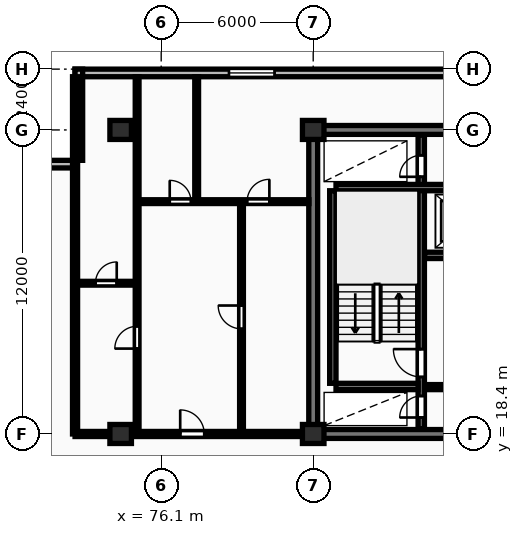
"""IFC4 building model, lengths in metres.
Left out: names, types, materials, properties, quantities, classifications, styles, units other than length and angle.
Written with IfcOpenShell. Run it as: python <this file> out.ifc"""

import sys

from ifc_helpers import new_model, si_unit, direction, frame, frame_2d, origin, origin_2d, place, context, subcontext, project, spatial, rectangle, extrude, element, fill, save


model = new_model("IFC4")
c1 = context("Model", 3, precision=1e-05, world=origin(), true_north=direction((0.0, 1.0)))
c2 = subcontext(c1, "Body", "Model", "MODEL_VIEW")
j1 = project(units=[si_unit("LENGTHUNIT", "METRE"), si_unit("PLANEANGLEUNIT", "RADIAN")], contexts=[c1])
p1 = place(None, origin())
s1 = spatial("IfcSite", under=j1, at=p1, CompositionType="ELEMENT")
p2 = place(p1, origin())
s2 = spatial("IfcBuilding", under=s1, at=p2, CompositionType="ELEMENT")
p3 = place(p2, frame((0.0, 0.0, 119.8)))
s3 = spatial("IfcBuildingStorey", under=s2, at=p3, CompositionType="ELEMENT", Elevation=119.8)
for number, where, z_axis, x_axis in (
    (1, (74.5, 18.4, 0.0), (0.0, 0.0, 1.0), (1.0, 0.0, 0.0)),
    (2, (74.5, 30.4, 0.0), (0.0, 0.0, 1.0), (1.0, 0.0, 0.0)),
    (3, (82.1, 18.4, 0.0), (0.0, 0.0, 1.0), (1.0, 0.0, 0.0)),
    (4, (82.1, 30.4, 0.0), (0.0, 0.0, 1.0), (1.0, 0.0, 0.0)),
):
    element("IfcColumn", number, at=place(p3, frame(where, z_axis=z_axis, x_axis=x_axis)), inside=s3, PredefinedType="COLUMN", context=c2, shape_type="SweptSolid", body=[
        extrude(rectangle(XDim=0.85, YDim=0.75, at=origin_2d()), origin(), (0.0, 0.0, 1.0), 3.25),
    ])
p4 = place(p3, frame((130.7, 32.65, 0.0), z_axis=(0.0, 0.0, 1.0), x_axis=(-1.0, 0.0, 0.0)))
e5 = element("IfcWall", 5, at=p4, inside=s3, PredefinedType="STANDARD", context=c2, shape_type="SweptSolid", body=[
    extrude(rectangle(XDim=58.0, YDim=0.3, at=frame_2d((29.0, 0.0))), origin(), (0.0, 0.0, 1.0), 2.97),
])
p5 = place(p4, frame((50.125, 0.0, 0.85)))
e6 = element("IfcOpeningElement", 6, at=p5, cuts=e5, PredefinedType="OPENING", context=c2, shape_type="SweptSolid", body=[
    extrude(rectangle(XDim=1.8, YDim=1.8, at=frame_2d((0.9, 0.9))), frame((0.0, 0.16, 0.0), z_axis=(0.0, -1.0, 0.0), x_axis=(1.0, 0.0, 0.0)), (0.0, 0.0, 1.0), 0.32),
])
p6 = place(p4, frame((6.775, 0.0, 0.85)))
e7 = element("IfcOpeningElement", 7, at=p6, cuts=e5, PredefinedType="OPENING", context=c2, shape_type="SweptSolid", body=[
    extrude(rectangle(XDim=1.8, YDim=1.8, at=frame_2d((0.9, 0.9))), frame((0.0, 0.16, 0.0), z_axis=(0.0, -1.0, 0.0), x_axis=(1.0, 0.0, 0.0)), (0.0, 0.0, 1.0), 0.32),
])
p7 = place(p3, frame((72.85, 32.8, 0.0), z_axis=(0.0, 0.0, 1.0), x_axis=(0.0, -1.0, 0.0)))
e8 = element("IfcWall", 8, at=p7, inside=s3, PredefinedType="STANDARD", context=c2, shape_type="SweptSolid", body=[
    extrude(rectangle(XDim=3.6, YDim=0.3, at=frame_2d((1.8, 0.0))), origin(), (0.0, 0.0, 1.0), 2.97),
])
p8 = place(p3, frame((72.7, 29.05, 0.0), z_axis=(0.0, 0.0, 1.0), x_axis=(-1.0, 0.0, 0.0)))
e9 = element("IfcWall", 9, at=p8, inside=s3, PredefinedType="STANDARD", context=c2, shape_type="SweptSolid", body=[
    extrude(rectangle(XDim=3.6, YDim=0.3, at=frame_2d((1.8, 0.0))), origin(), (0.0, 0.0, 1.0), 2.97),
])
p9 = place(p3, frame((81.925, 30.4, 0.0), z_axis=(0.0, 0.0, 1.0), x_axis=(1.0, 0.0, 0.0)))
e10 = element("IfcWall", 10, at=p9, inside=s3, PredefinedType="SHEAR", context=c2, shape_type="SweptSolid", body=[
    extrude(rectangle(XDim=36.265, YDim=0.35, at=frame_2d((18.132, 0.0))), origin(), (0.0, 0.0, 1.0), 3.25),
])
p10 = place(p3, frame((82.1, 18.575, 0.0), z_axis=(0.0, 0.0, 1.0), x_axis=(0.0, 1.0, 0.0)))
e11 = element("IfcWall", 11, at=p10, inside=s3, PredefinedType="SHEAR", context=c2, shape_type="SweptSolid", body=[
    extrude(rectangle(XDim=11.65, YDim=0.35, at=frame_2d((5.825, 0.0))), origin(), (0.0, 0.0, 1.0), 3.25),
])
p11 = place(p3, frame((81.925, 18.4, 0.0), z_axis=(0.0, 0.0, 1.0), x_axis=(1.0, 0.0, 0.0)))
e12 = element("IfcWall", 12, at=p11, inside=s3, PredefinedType="SHEAR", context=c2, shape_type="SweptSolid", body=[
    extrude(rectangle(XDim=36.265, YDim=0.35, at=frame_2d((18.132, 0.0))), origin(), (0.0, 0.0, 1.0), 3.25),
])
p12 = place(p11, frame((5.675, 0.0, 0.0)))
e13 = element("IfcOpeningElement", 13, at=p12, cuts=e12, PredefinedType="OPENING", context=c2, shape_type="SweptSolid", body=[
    extrude(rectangle(XDim=1.0, YDim=2.15, at=frame_2d((0.5, 1.075))), frame((0.0, 0.185, 0.0), z_axis=(0.0, -1.0, 0.0), x_axis=(1.0, 0.0, 0.0)), (0.0, 0.0, 1.0), 0.37),
])
p13 = place(p11, frame((21.925, 0.0, 0.0)))
e14 = element("IfcOpeningElement", 14, at=p13, cuts=e12, PredefinedType="OPENING", context=c2, shape_type="SweptSolid", body=[
    extrude(rectangle(XDim=1.5, YDim=2.2, at=frame_2d((0.75, 1.1))), frame((0.0, 0.185, 0.0), z_axis=(0.0, -1.0, 0.0), x_axis=(1.0, 0.0, 0.0)), (0.0, 0.0, 1.0), 0.37),
])
p14 = place(p11, frame((29.875, 0.0, 0.0)))
e15 = element("IfcOpeningElement", 15, at=p14, cuts=e12, PredefinedType="OPENING", context=c2, shape_type="SweptSolid", body=[
    extrude(rectangle(XDim=1.0, YDim=2.15, at=frame_2d((0.5, 1.075))), frame((0.0, 0.185, 0.0), z_axis=(0.0, -1.0, 0.0), x_axis=(1.0, 0.0, 0.0)), (0.0, 0.0, 1.0), 0.37),
])
p15 = place(p3, frame((82.875, 20.4, 0.0), z_axis=(0.0, 0.0, 1.0), x_axis=(0.0, 1.0, 0.0)))
e16 = element("IfcWall", 16, at=p15, inside=s3, PredefinedType="SHEAR", context=c2, shape_type="SweptSolid", body=[
    extrude(rectangle(XDim=7.6, YDim=0.25, at=frame_2d((3.8, 0.0))), origin(), (0.0, 0.0, 1.0), 3.25),
])
p16 = place(p3, frame((86.365, 18.6, 0.0), z_axis=(0.0, 0.0, 1.0), x_axis=(0.0, 1.0, 0.0)))
e17 = element("IfcWall", 17, at=p16, inside=s3, PredefinedType="SHEAR", context=c2, shape_type="SweptSolid", body=[
    extrude(rectangle(XDim=11.6, YDim=0.25, at=frame_2d((5.8, 0.0))), origin(), (0.0, 0.0, 1.0), 3.25),
])
p17 = place(p16, frame((0.45, 0.0, 0.0)))
e18 = element("IfcOpeningElement", 18, at=p17, cuts=e17, PredefinedType="OPENING", context=c2, shape_type="SweptSolid", body=[
    extrude(rectangle(XDim=0.85, YDim=2.05, at=frame_2d((0.425, 1.025))), frame((0.0, 0.135, 0.0), z_axis=(0.0, -1.0, 0.0), x_axis=(1.0, 0.0, 0.0)), (0.0, 0.0, 1.0), 0.27),
])
p18 = place(p16, frame((2.05, 0.0, 0.0)))
e19 = element("IfcOpeningElement", 19, at=p18, cuts=e17, PredefinedType="OPENING", context=c2, shape_type="SweptSolid", body=[
    extrude(rectangle(XDim=1.1, YDim=2.1, at=frame_2d((0.55, 1.05))), frame((0.0, 0.135, 0.0), z_axis=(0.0, -1.0, 0.0), x_axis=(1.0, 0.0, 0.0)), (0.0, 0.0, 1.0), 0.27),
])
p19 = place(p16, frame((9.95, 0.0, 0.0)))
e20 = element("IfcOpeningElement", 20, at=p19, cuts=e17, PredefinedType="OPENING", context=c2, shape_type="SweptSolid", body=[
    extrude(rectangle(XDim=0.85, YDim=2.05, at=frame_2d((0.425, 1.025))), frame((0.0, 0.135, 0.0), z_axis=(0.0, -1.0, 0.0), x_axis=(1.0, 0.0, 0.0)), (0.0, 0.0, 1.0), 0.27),
])
p20 = place(p3, frame((83.0, 20.275, 0.0), z_axis=(0.0, 0.0, 1.0), x_axis=(1.0, 0.0, 0.0)))
e21 = element("IfcWall", 21, at=p20, inside=s3, PredefinedType="SHEAR", context=c2, shape_type="SweptSolid", body=[
    extrude(rectangle(XDim=3.24, YDim=0.25, at=frame_2d((1.62, 0.0))), origin(), (0.0, 0.0, 1.0), 3.25),
])
p21 = place(p3, frame((83.0, 28.125, 0.0), z_axis=(0.0, 0.0, 1.0), x_axis=(1.0, 0.0, 0.0)))
e22 = element("IfcWall", 22, at=p21, inside=s3, PredefinedType="SHEAR", context=c2, shape_type="SweptSolid", body=[
    extrude(rectangle(XDim=7.82, YDim=0.25, at=frame_2d((3.91, 0.0))), origin(), (0.0, 0.0, 1.0), 3.25),
])
p22 = place(p3, frame((86.5, 25.45, 0.0), z_axis=(0.0, 0.0, 1.0), x_axis=(1.0, 0.0, 0.0)))
e23 = element("IfcWall", 23, at=p22, inside=s3, PredefinedType="SHEAR", context=c2, shape_type="SweptSolid", body=[
    extrude(rectangle(XDim=4.32, YDim=0.25, at=frame_2d((2.16, 0.0))), origin(), (0.0, 0.0, 1.0), 3.25),
])
p23 = place(p22, frame((1.14, 0.0, 0.0)))
e24 = element("IfcOpeningElement", 24, at=p23, cuts=e23, PredefinedType="OPENING", context=c2, shape_type="SweptSolid", body=[
    extrude(rectangle(XDim=1.12, YDim=2.12, at=frame_2d((0.56, 1.06))), frame((0.0, 0.135, 0.0), z_axis=(0.0, -1.0, 0.0), x_axis=(1.0, 0.0, 0.0)), (0.0, 0.0, 1.0), 0.27),
])
p24 = place(p22, frame((3.25, 0.0, 0.0)))
e25 = element("IfcOpeningElement", 25, at=p24, cuts=e23, PredefinedType="OPENING", context=c2, shape_type="SweptSolid", body=[
    extrude(rectangle(XDim=0.85, YDim=2.05, at=frame_2d((0.425, 1.025))), frame((0.0, 0.135, 0.0), z_axis=(0.0, -1.0, 0.0), x_axis=(1.0, 0.0, 0.0)), (0.0, 0.0, 1.0), 0.27),
])
p25 = place(p3, frame((86.5, 20.25, 0.0), z_axis=(0.0, 0.0, 1.0), x_axis=(1.0, 0.0, 0.0)))
e26 = element("IfcWall", 26, at=p25, inside=s3, PredefinedType="PARTITIONING", context=c2, shape_type="SweptSolid", body=[
    extrude(rectangle(XDim=4.32, YDim=0.2, at=frame_2d((2.16, 0.0))), origin(), (0.0, 0.0, 1.0), 2.97),
])
p26 = place(p25, frame((1.4, 0.0, 0.0)))
e27 = element("IfcOpeningElement", 27, at=p26, cuts=e26, PredefinedType="OPENING", context=c2, shape_type="SweptSolid", body=[
    extrude(rectangle(XDim=1.1, YDim=2.1, at=frame_2d((0.55, 1.05))), frame((0.0, 0.11, 0.0), z_axis=(0.0, -1.0, 0.0), x_axis=(1.0, 0.0, 0.0)), (0.0, 0.0, 1.0), 0.22),
])
p27 = place(p3, frame((72.7, 18.4, 0.0), z_axis=(0.0, 0.0, 1.0), x_axis=(0.0, 1.0, 0.0)))
e28 = element("IfcWall", 28, at=p27, inside=s3, PredefinedType="PARTITIONING", context=c2, shape_type="SweptSolid", body=[
    extrude(rectangle(XDim=14.1, YDim=0.2, at=frame_2d((7.05, 0.0))), origin(), (0.0, 0.0, 1.0), 2.97),
])
p28 = place(p3, frame((72.7, 24.35, 0.0), z_axis=(0.0, 0.0, 1.0), x_axis=(1.0, 0.0, 0.0)))
e29 = element("IfcWall", 29, at=p28, inside=s3, PredefinedType="PARTITIONING", context=c2, shape_type="SweptSolid", body=[
    extrude(rectangle(XDim=2.45, YDim=0.15, at=frame_2d((1.225, 0.0))), origin(), (0.0, 0.0, 1.0), 2.97),
])
p29 = place(p28, frame((0.805, 0.0, 0.0)))
e30 = element("IfcOpeningElement", 30, at=p29, cuts=e29, PredefinedType="OPENING", context=c2, shape_type="SweptSolid", body=[
    extrude(rectangle(XDim=0.84, YDim=2.04, at=frame_2d((0.42, 1.02))), frame((0.0, 0.085, 0.0), z_axis=(0.0, -1.0, 0.0), x_axis=(1.0, 0.0, 0.0)), (0.0, 0.0, 1.0), 0.17),
])
p30 = place(p3, frame((75.15, 18.45, 0.0), z_axis=(0.0, 0.0, 1.0), x_axis=(0.0, 1.0, 0.0)))
e31 = element("IfcWall", 31, at=p30, inside=s3, PredefinedType="PARTITIONING", context=c2, shape_type="SweptSolid", body=[
    extrude(rectangle(XDim=14.05, YDim=0.15, at=frame_2d((7.025, 0.0))), origin(), (0.0, 0.0, 1.0), 2.97),
])
p31 = place(p30, frame((3.32, 0.0, 0.0)))
e32 = element("IfcOpeningElement", 32, at=p31, cuts=e31, PredefinedType="OPENING", context=c2, shape_type="SweptSolid", body=[
    extrude(rectangle(XDim=0.88, YDim=2.06, at=frame_2d((0.44, 1.03))), frame((0.0, 0.085, 0.0), z_axis=(0.0, -1.0, 0.0), x_axis=(1.0, 0.0, 0.0)), (0.0, 0.0, 1.0), 0.17),
])
p32 = place(p3, frame((79.27, 18.45, 0.0), z_axis=(0.0, 0.0, 1.0), x_axis=(0.0, 1.0, 0.0)))
e33 = element("IfcWall", 33, at=p32, inside=s3, PredefinedType="PARTITIONING", context=c2, shape_type="SweptSolid", body=[
    extrude(rectangle(XDim=9.12, YDim=0.15, at=frame_2d((4.56, 0.0))), origin(), (0.0, 0.0, 1.0), 2.97),
])
p33 = place(p32, frame((4.1, 0.0, 0.0)))
e34 = element("IfcOpeningElement", 34, at=p33, cuts=e33, PredefinedType="OPENING", context=c2, shape_type="SweptSolid", body=[
    extrude(rectangle(XDim=0.92, YDim=2.08, at=frame_2d((0.46, 1.04))), frame((0.0, 0.085, 0.0), z_axis=(0.0, -1.0, 0.0), x_axis=(1.0, 0.0, 0.0)), (0.0, 0.0, 1.0), 0.17),
])
p34 = place(p3, frame((77.5, 27.57, 0.0), z_axis=(0.0, 0.0, 1.0), x_axis=(0.0, 1.0, 0.0)))
e35 = element("IfcWall", 35, at=p34, inside=s3, PredefinedType="PARTITIONING", context=c2, shape_type="SweptSolid", body=[
    extrude(rectangle(XDim=4.93, YDim=0.15, at=frame_2d((2.465, 0.0))), origin(), (0.0, 0.0, 1.0), 2.97),
])
p35 = place(p3, frame((75.17, 27.57, 0.0), z_axis=(0.0, 0.0, 1.0), x_axis=(1.0, 0.0, 0.0)))
e36 = element("IfcWall", 36, at=p35, inside=s3, PredefinedType="PARTITIONING", context=c2, shape_type="SweptSolid", body=[
    extrude(rectangle(XDim=6.76, YDim=0.15, at=frame_2d((3.38, 0.0))), origin(), (0.0, 0.0, 1.0), 2.97),
])
p36 = place(p35, frame((1.266, 0.0, 0.0)))
e37 = element("IfcOpeningElement", 37, at=p36, cuts=e36, PredefinedType="OPENING", context=c2, shape_type="SweptSolid", body=[
    extrude(rectangle(XDim=0.84, YDim=2.04, at=frame_2d((0.42, 1.02))), frame((0.0, 0.085, 0.0), z_axis=(0.0, -1.0, 0.0), x_axis=(1.0, 0.0, 0.0)), (0.0, 0.0, 1.0), 0.17),
])
p37 = place(p35, frame((4.32, 0.0, 0.0)))
e38 = element("IfcOpeningElement", 38, at=p37, cuts=e36, PredefinedType="OPENING", context=c2, shape_type="SweptSolid", body=[
    extrude(rectangle(XDim=0.88, YDim=2.06, at=frame_2d((0.44, 1.03))), frame((0.0, 0.085, 0.0), z_axis=(0.0, -1.0, 0.0), x_axis=(1.0, 0.0, 0.0)), (0.0, 0.0, 1.0), 0.17),
])
p38 = place(p3, frame((72.7, 18.4, 0.0), z_axis=(0.0, 0.0, 1.0), x_axis=(1.0, 0.0, 0.0)))
e39 = element("IfcWall", 39, at=p38, inside=s3, PredefinedType="PARTITIONING", context=c2, shape_type="SweptSolid", body=[
    extrude(rectangle(XDim=9.25, YDim=0.2, at=frame_2d((4.625, 0.0))), origin(), (0.0, 0.0, 1.0), 2.358),
])
p39 = place(p38, frame((4.15, 0.0, 0.0)))
e40 = element("IfcOpeningElement", 40, at=p39, cuts=e39, PredefinedType="OPENING", context=c2, shape_type="SweptSolid", body=[
    extrude(rectangle(XDim=0.95, YDim=2.15, at=frame_2d((0.475, 1.075))), frame((0.0, 0.11, 0.0), z_axis=(0.0, -1.0, 0.0), x_axis=(1.0, 0.0, 0.0)), (0.0, 0.0, 1.0), 0.22),
])
p40 = place(p5, origin())
e41 = element("IfcWindow", 41, at=p40, inside=s3, PartitioningType="SINGLE_PANEL", PredefinedType="WINDOW", context=c2, shape_type="SweptSolid", body=[
    extrude(rectangle(XDim=1.8, YDim=1.8, at=frame_2d((0.9, 0.9))), frame((0.0, 0.03, 0.0), z_axis=(0.0, -1.0, 0.0), x_axis=(1.0, 0.0, 0.0)), (0.0, 0.0, 1.0), 0.06),
])
fill(e6, e41)
p41 = place(p17, origin())
e42 = element("IfcDoor", 42, at=p41, inside=s3, OperationType="SINGLE_SWING_LEFT", PredefinedType="DOOR", context=c2, shape_type="SweptSolid", body=[
    extrude(rectangle(XDim=0.85, YDim=2.05, at=frame_2d((0.425, 1.025))), frame((0.0, 0.025, 0.0), z_axis=(0.0, -1.0, 0.0), x_axis=(1.0, 0.0, 0.0)), (0.0, 0.0, 1.0), 0.05),
])
fill(e18, e42)
p42 = place(p18, origin())
e43 = element("IfcDoor", 43, at=p42, inside=s3, OperationType="SINGLE_SWING_RIGHT", PredefinedType="DOOR", context=c2, shape_type="SweptSolid", body=[
    extrude(rectangle(XDim=1.1, YDim=2.1, at=frame_2d((0.55, 1.05))), frame((0.0, 0.025, 0.0), z_axis=(0.0, -1.0, 0.0), x_axis=(1.0, 0.0, 0.0)), (0.0, 0.0, 1.0), 0.05),
])
fill(e19, e43)
p43 = place(p19, origin())
e44 = element("IfcDoor", 44, at=p43, inside=s3, OperationType="SINGLE_SWING_LEFT", PredefinedType="DOOR", context=c2, shape_type="SweptSolid", body=[
    extrude(rectangle(XDim=0.85, YDim=2.05, at=frame_2d((0.425, 1.025))), frame((0.0, 0.025, 0.0), z_axis=(0.0, -1.0, 0.0), x_axis=(1.0, 0.0, 0.0)), (0.0, 0.0, 1.0), 0.05),
])
fill(e20, e44)
p44 = place(p29, origin())
e45 = element("IfcDoor", 45, at=p44, inside=s3, OperationType="SINGLE_SWING_RIGHT", PredefinedType="DOOR", context=c2, shape_type="SweptSolid", body=[
    extrude(rectangle(XDim=0.84, YDim=2.04, at=frame_2d((0.42, 1.02))), frame((0.0, 0.025, 0.0), z_axis=(0.0, -1.0, 0.0), x_axis=(1.0, 0.0, 0.0)), (0.0, 0.0, 1.0), 0.05),
])
fill(e30, e45)
p45 = place(p31, origin())
e46 = element("IfcDoor", 46, at=p45, inside=s3, OperationType="SINGLE_SWING_LEFT", PredefinedType="DOOR", context=c2, shape_type="SweptSolid", body=[
    extrude(rectangle(XDim=0.88, YDim=2.06, at=frame_2d((0.44, 1.03))), frame((0.0, 0.025, 0.0), z_axis=(0.0, -1.0, 0.0), x_axis=(1.0, 0.0, 0.0)), (0.0, 0.0, 1.0), 0.05),
])
fill(e32, e46)
p46 = place(p33, origin())
e47 = element("IfcDoor", 47, at=p46, inside=s3, OperationType="SINGLE_SWING_RIGHT", PredefinedType="DOOR", context=c2, shape_type="SweptSolid", body=[
    extrude(rectangle(XDim=0.92, YDim=2.08, at=frame_2d((0.46, 1.04))), frame((0.0, 0.025, 0.0), z_axis=(0.0, -1.0, 0.0), x_axis=(1.0, 0.0, 0.0)), (0.0, 0.0, 1.0), 0.05),
])
fill(e34, e47)
p47 = place(p36, origin())
e48 = element("IfcDoor", 48, at=p47, inside=s3, OperationType="SINGLE_SWING_LEFT", PredefinedType="DOOR", context=c2, shape_type="SweptSolid", body=[
    extrude(rectangle(XDim=0.84, YDim=2.04, at=frame_2d((0.42, 1.02))), frame((0.0, 0.025, 0.0), z_axis=(0.0, -1.0, 0.0), x_axis=(1.0, 0.0, 0.0)), (0.0, 0.0, 1.0), 0.05),
])
fill(e37, e48)
p48 = place(p37, origin())
e49 = element("IfcDoor", 49, at=p48, inside=s3, OperationType="SINGLE_SWING_RIGHT", PredefinedType="DOOR", context=c2, shape_type="SweptSolid", body=[
    extrude(rectangle(XDim=0.88, YDim=2.06, at=frame_2d((0.44, 1.03))), frame((0.0, 0.025, 0.0), z_axis=(0.0, -1.0, 0.0), x_axis=(1.0, 0.0, 0.0)), (0.0, 0.0, 1.0), 0.05),
])
fill(e38, e49)
p49 = place(p39, origin())
e50 = element("IfcDoor", 50, at=p49, inside=s3, OperationType="SINGLE_SWING_LEFT", PredefinedType="DOOR", context=c2, shape_type="SweptSolid", body=[
    extrude(rectangle(XDim=0.95, YDim=2.15, at=frame_2d((0.475, 1.075))), frame((0.0, 0.025, 0.0), z_axis=(0.0, -1.0, 0.0), x_axis=(1.0, 0.0, 0.0)), (0.0, 0.0, 1.0), 0.05),
])
fill(e40, e50)
save(model, sys.argv[1])
